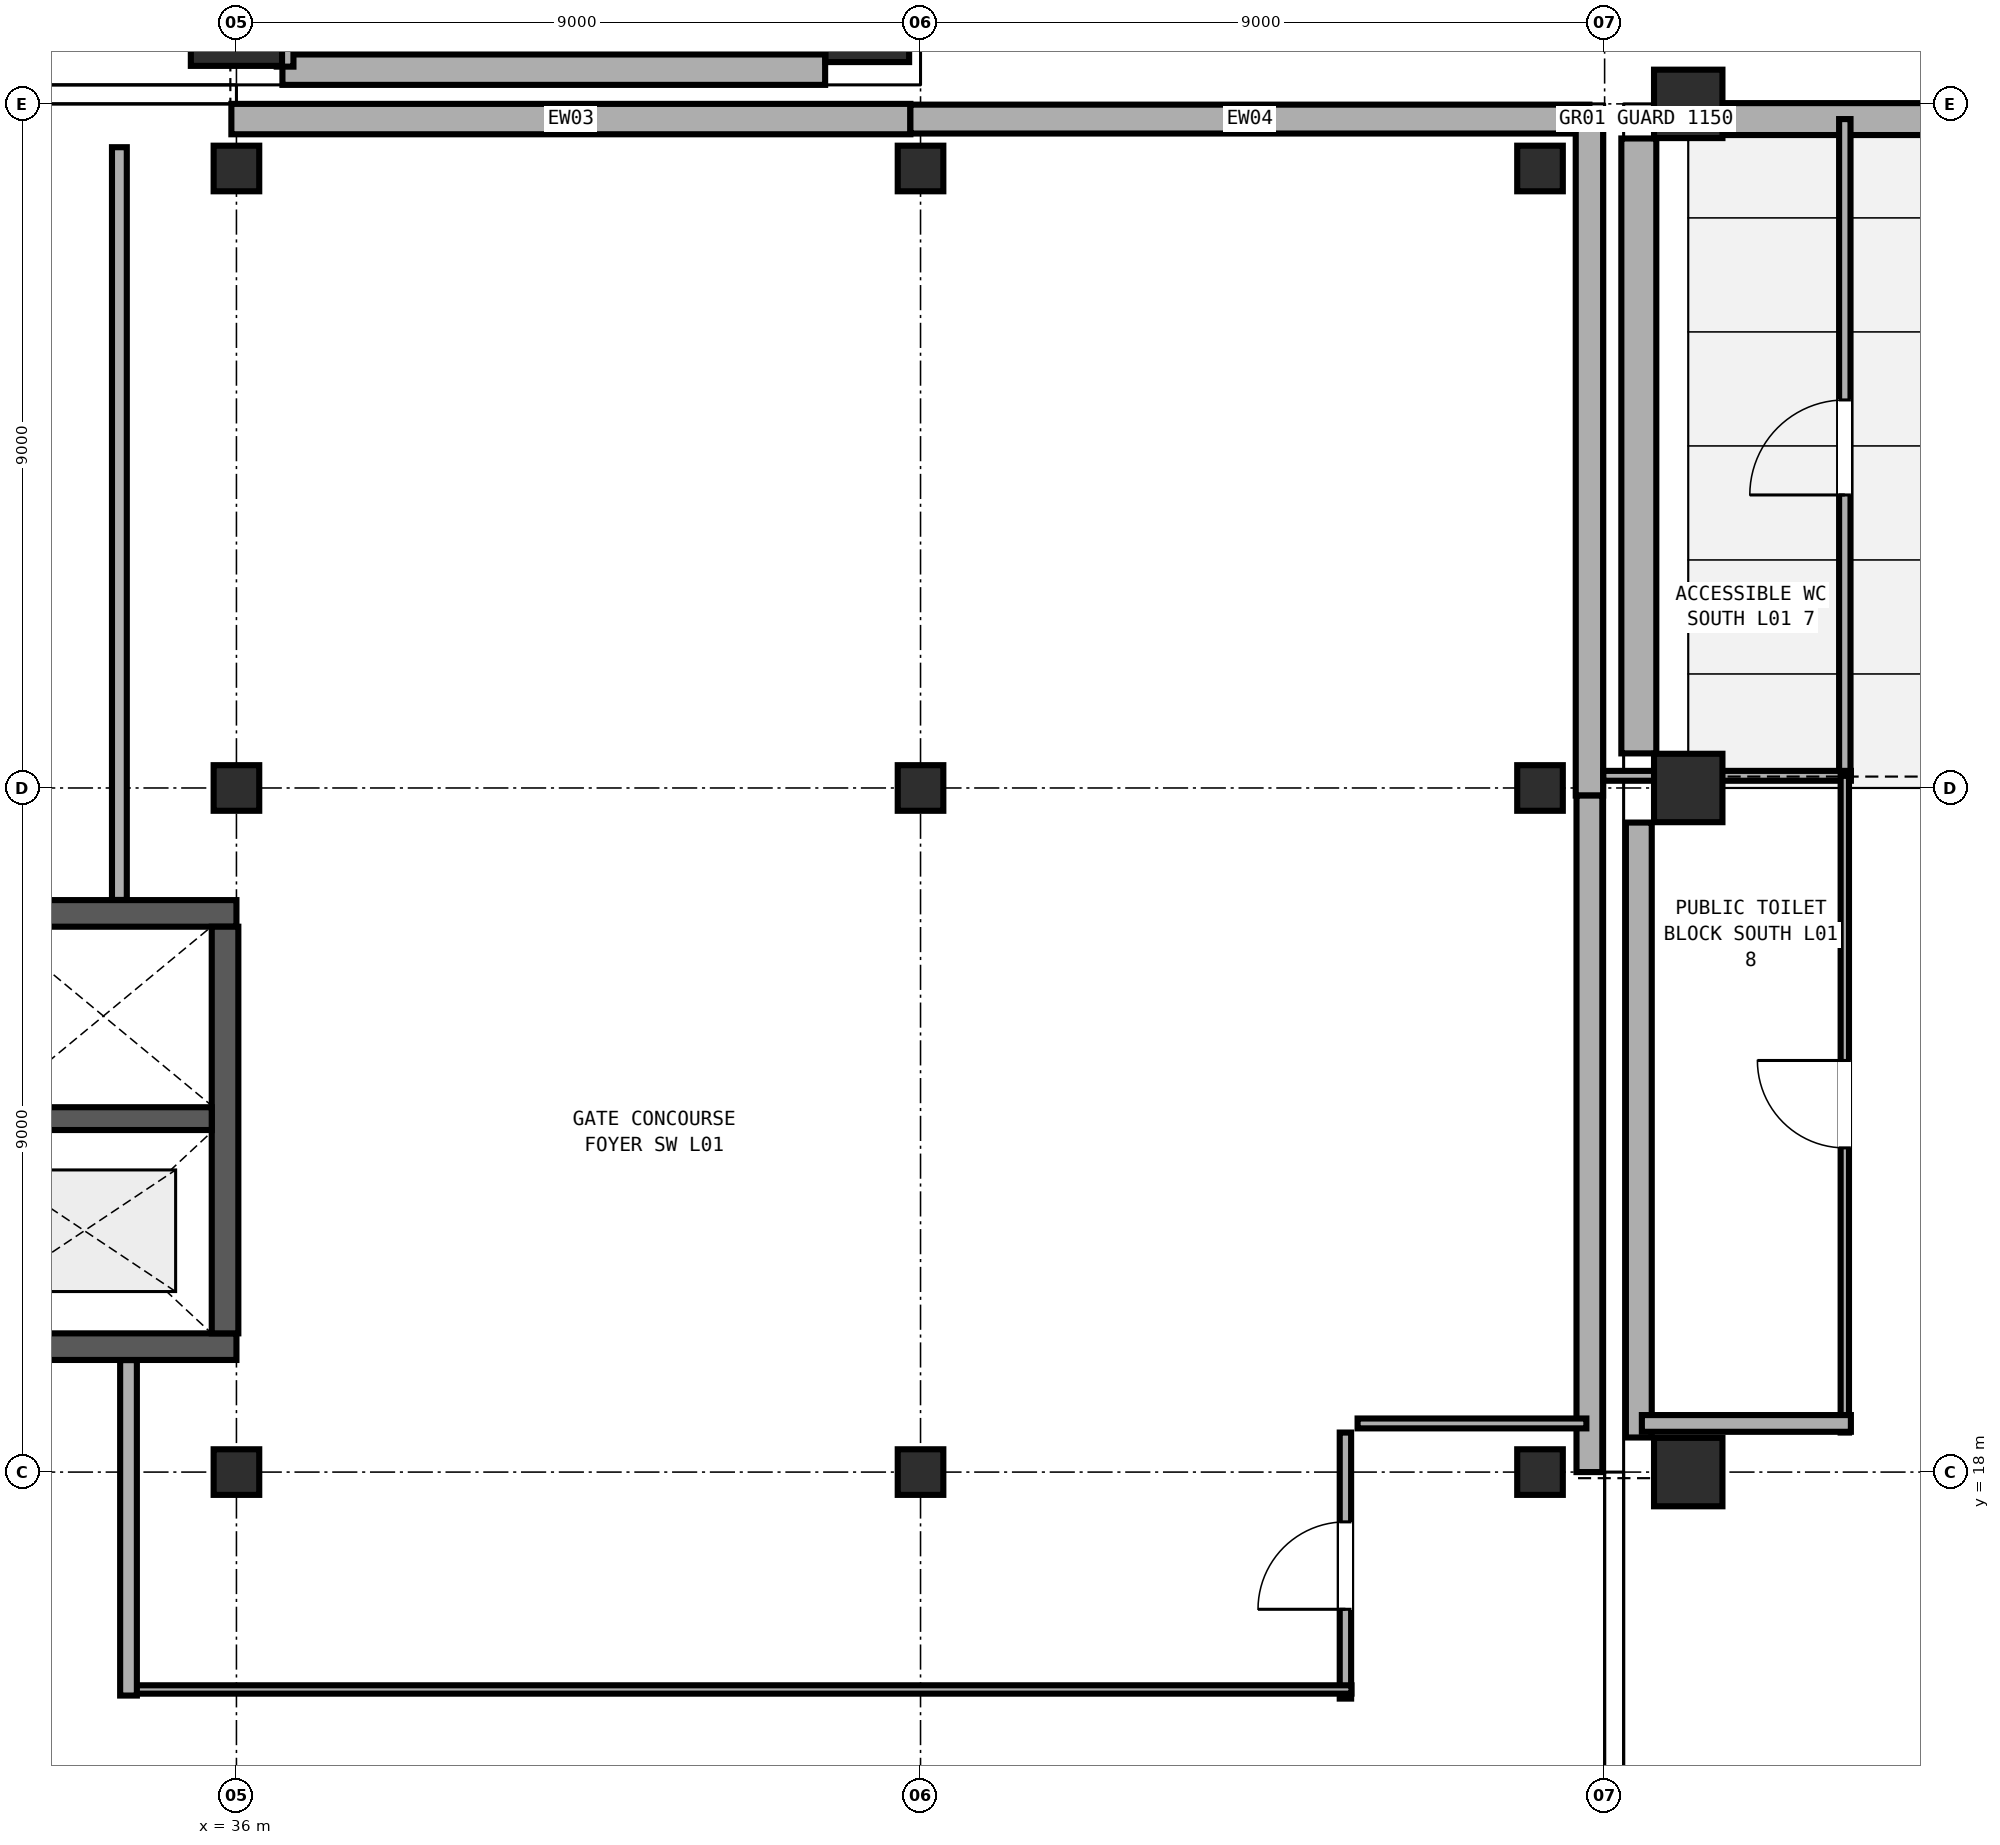
"""IFC4 building model, lengths in metres.
Left out: names, types, materials, properties, quantities, classifications, styles, units other than length and angle.
Written with IfcOpenShell. Run it as: python <this file> out.ifc"""

import sys

from ifc_helpers import new_model, si_unit, direction, frame, frame_2d, origin, origin_2d, place, context, subcontext, project, spatial, rectangle, extrude, element, fill, save


model = new_model("IFC4")
c1 = context("Model", 3, precision=1e-05, world=origin(), true_north=direction((0.0, 1.0)))
c2 = subcontext(c1, "Body", "Model", "MODEL_VIEW")
j1 = project(units=[si_unit("LENGTHUNIT", "METRE"), si_unit("PLANEANGLEUNIT", "RADIAN")], contexts=[c1])
p1 = place(None, origin())
s1 = spatial("IfcSite", under=j1, at=p1, CompositionType="ELEMENT")
p2 = place(p1, origin())
s2 = spatial("IfcBuilding", under=s1, at=p2, CompositionType="ELEMENT")
p3 = place(p2, frame((0.0, 0.0, 4.8)))
s3 = spatial("IfcBuildingStorey", under=s2, at=p3, CompositionType="ELEMENT", Elevation=4.8)
p4 = place(p3, frame((36.0, 37.1, 0.0), z_axis=(0.0, 0.0, 1.0), x_axis=(1.0, 0.0, 0.0)))
e1 = element("IfcColumn", 1, at=p4, inside=s3, PredefinedType="COLUMN", context=c2, shape_type="SweptSolid", body=[
    extrude(rectangle(XDim=1.2, YDim=1.2, at=origin_2d()), origin(), (0.0, 0.0, 1.0), 4.8),
])
p5 = place(p3, frame((44.3, 37.1, 0.0), z_axis=(0.0, 0.0, 1.0), x_axis=(1.0, 0.0, 0.0)))
e2 = element("IfcColumn", 2, at=p5, inside=s3, PredefinedType="COLUMN", context=c2, shape_type="SweptSolid", body=[
    extrude(rectangle(XDim=1.1, YDim=1.1, at=origin_2d()), origin(), (0.0, 0.0, 1.0), 4.8),
])
for number, where, z_axis, x_axis in (
    (3, (55.1, 18.0, 0.0), (0.0, 0.0, 1.0), (1.0, 0.0, 0.0)),
    (4, (55.1, 27.0, 0.0), (0.0, 0.0, 1.0), (1.0, 0.0, 0.0)),
    (5, (55.1, 36.0, 0.0), (0.0, 0.0, 1.0), (1.0, 0.0, 0.0)),
):
    element("IfcColumn", number, at=place(p3, frame(where, z_axis=z_axis, x_axis=x_axis)), inside=s3, PredefinedType="COLUMN", context=c2, shape_type="SweptSolid", body=[
        extrude(rectangle(XDim=0.9, YDim=0.9, at=origin_2d()), origin(), (0.0, 0.0, 1.0), 4.8),
    ])
for number, where, z_axis, x_axis in (
    (6, (36.0, 18.0, 0.0), (0.0, 0.0, 1.0), (1.0, 0.0, 0.0)),
    (7, (36.0, 27.0, 0.0), (0.0, 0.0, 1.0), (1.0, 0.0, 0.0)),
    (8, (36.0, 35.15, 0.0), (0.0, 0.0, 1.0), (1.0, 0.0, 0.0)),
    (9, (45.0, 18.0, 0.0), (0.0, 0.0, 1.0), (1.0, 0.0, 0.0)),
    (10, (45.0, 27.0, 0.0), (0.0, 0.0, 1.0), (1.0, 0.0, 0.0)),
    (11, (45.0, 35.15, 0.0), (0.0, 0.0, 1.0), (1.0, 0.0, 0.0)),
    (12, (53.15, 18.0, 0.0), (0.0, 0.0, 1.0), (1.0, 0.0, 0.0)),
    (13, (53.15, 27.0, 0.0), (0.0, 0.0, 1.0), (1.0, 0.0, 0.0)),
    (14, (53.15, 35.15, 0.0), (0.0, 0.0, 1.0), (1.0, 0.0, 0.0)),
):
    element("IfcColumn", number, at=place(p3, frame(where, z_axis=z_axis, x_axis=x_axis)), inside=s3, PredefinedType="COLUMN", context=c2, shape_type="SweptSolid", body=[
        extrude(rectangle(XDim=0.6, YDim=0.6, at=origin_2d()), origin(), (0.0, 0.0, 1.0), 4.8),
    ])
p6 = place(p3, frame((18.0, 19.65, 0.0), z_axis=(0.0, 0.0, 1.0), x_axis=(1.0, 0.0, 0.0)))
e15 = element("IfcWall", 15, at=p6, inside=s3, PredefinedType="SHEAR", context=c2, shape_type="SweptSolid", body=[
    extrude(rectangle(XDim=18.0, YDim=0.35, at=frame_2d((9.0, 0.0))), origin(), (0.0, 0.0, 1.0), 4.565),
])
p7 = place(p6, frame((11.4, 0.0, 0.0)))
e16 = element("IfcOpeningElement", 16, at=p7, cuts=e15, PredefinedType="OPENING", context=c2, shape_type="SweptSolid", body=[
    extrude(rectangle(XDim=1.9, YDim=2.25, at=frame_2d((0.95, 1.125))), frame((0.0, 0.185, 0.0), z_axis=(0.0, -1.0, 0.0), x_axis=(1.0, 0.0, 0.0)), (0.0, 0.0, 1.0), 0.37),
])
p8 = place(p3, frame((36.0, 25.35, 0.0), z_axis=(0.0, 0.0, 1.0), x_axis=(-1.0, 0.0, 0.0)))
e17 = element("IfcWall", 17, at=p8, inside=s3, PredefinedType="SHEAR", context=c2, shape_type="SweptSolid", body=[
    extrude(rectangle(XDim=18.0, YDim=0.35, at=frame_2d((9.0, 0.0))), origin(), (0.0, 0.0, 1.0), 4.565),
])
p9 = place(p3, frame((35.85, 19.825, 0.0), z_axis=(0.0, 0.0, 1.0), x_axis=(0.0, 1.0, 0.0)))
e18 = element("IfcWall", 18, at=p9, inside=s3, PredefinedType="SHEAR", context=c2, shape_type="SweptSolid", body=[
    extrude(rectangle(XDim=5.35, YDim=0.35, at=frame_2d((2.675, 0.0))), origin(), (0.0, 0.0, 1.0), 4.565),
])
p10 = place(p3, frame((32.8, 22.65, 0.0), z_axis=(0.0, 0.0, 1.0), x_axis=(1.0, 0.0, 0.0)))
e19 = element("IfcWall", 19, at=p10, inside=s3, PredefinedType="SHEAR", context=c2, shape_type="SweptSolid", body=[
    extrude(rectangle(XDim=2.875, YDim=0.3, at=frame_2d((1.438, 0.0))), origin(), (0.0, 0.0, 1.0), 4.565),
])
p11 = place(p3, frame((43.745, 36.45, 0.0), z_axis=(0.0, 0.0, 1.0), x_axis=(-1.0, 0.0, 0.0)))
e20 = element("IfcWall", 20, at=p11, inside=s3, PredefinedType="SOLIDWALL", context=c2, shape_type="SweptSolid", body=[
    extrude(rectangle(XDim=7.14, YDim=0.4, at=frame_2d((3.57, 0.0))), origin(), (0.0, 0.0, 1.0), 3.28),
])
p12 = place(p3, frame((54.45, 18.455, 0.0), z_axis=(0.0, 0.0, 1.0), x_axis=(0.0, 1.0, 0.0)))
e21 = element("IfcWall", 21, at=p12, inside=s3, PredefinedType="SOLIDWALL", context=c2, shape_type="SweptSolid", body=[
    extrude(rectangle(XDim=8.09, YDim=0.34, at=frame_2d((4.045, 0.0))), origin(), (0.0, 0.0, 1.0), 3.28),
])
p13 = place(p3, frame((54.45, 27.455, 0.0), z_axis=(0.0, 0.0, 1.0), x_axis=(0.0, 1.0, 0.0)))
e22 = element("IfcWall", 22, at=p13, inside=s3, PredefinedType="SOLIDWALL", context=c2, shape_type="SweptSolid", body=[
    extrude(rectangle(XDim=8.09, YDim=0.46, at=frame_2d((4.045, 0.0))), origin(), (0.0, 0.0, 1.0), 3.28),
])
p14 = place(p3, frame((55.555, 35.8, 0.0), z_axis=(0.0, 0.0, 1.0), x_axis=(1.0, 0.0, 0.0)))
e23 = element("IfcWall", 23, at=p14, inside=s3, PredefinedType="SOLIDWALL", context=c2, shape_type="SweptSolid", body=[
    extrude(rectangle(XDim=6.99, YDim=0.42, at=frame_2d((3.495, 0.0))), origin(), (0.0, 0.0, 1.0), 3.28),
])
p15 = place(p3, frame((35.933, 35.8, 0.0), z_axis=(0.0, 0.0, 1.0), x_axis=(1.0, 0.0, 0.0)))
e24 = element("IfcWall", 24, at=p15, inside=s3, PredefinedType="SOLIDWALL", context=c2, shape_type="SweptSolid", body=[
    extrude(rectangle(XDim=8.933, YDim=0.4, at=frame_2d((4.467, 0.0))), origin(), (0.0, 0.0, 1.0), 3.28),
])
p16 = place(p3, frame((44.867, 35.8, 0.0), z_axis=(0.0, 0.0, 1.0), x_axis=(1.0, 0.0, 0.0)))
e25 = element("IfcWall", 25, at=p16, inside=s3, PredefinedType="SOLIDWALL", context=c2, shape_type="SweptSolid", body=[
    extrude(rectangle(XDim=8.933, YDim=0.38, at=frame_2d((4.467, 0.0))), origin(), (0.0, 0.0, 1.0), 3.28),
])
p17 = place(p3, frame((53.8, 35.8, 0.0), z_axis=(0.0, 0.0, 1.0), x_axis=(0.0, -1.0, 0.0)))
e26 = element("IfcWall", 26, at=p17, inside=s3, PredefinedType="SOLIDWALL", context=c2, shape_type="SweptSolid", body=[
    extrude(rectangle(XDim=8.9, YDim=0.36, at=frame_2d((4.45, 0.0))), origin(), (0.0, 0.0, 1.0), 3.28),
])
p18 = place(p3, frame((53.8, 26.9, 0.0), z_axis=(0.0, 0.0, 1.0), x_axis=(0.0, -1.0, 0.0)))
e27 = element("IfcWall", 27, at=p18, inside=s3, PredefinedType="SOLIDWALL", context=c2, shape_type="SweptSolid", body=[
    extrude(rectangle(XDim=8.9, YDim=0.34, at=frame_2d((4.45, 0.0))), origin(), (0.0, 0.0, 1.0), 3.28),
])
p19 = place(p3, frame((36.64, 36.49, 0.0), z_axis=(0.0, 0.0, 1.0), x_axis=(0.0, 1.0, 0.0)))
e28 = element("IfcWall", 28, at=p19, inside=s3, PredefinedType="PARTITIONING", context=c2, shape_type="SweptSolid", body=[
    extrude(rectangle(XDim=3.01, YDim=0.22, at=frame_2d((1.505, 0.0))), origin(), (0.0, 0.0, 1.0), 3.28),
])
p20 = place(p3, frame((57.16, 27.16, 0.0), z_axis=(0.0, 0.0, 1.0), x_axis=(0.0, 1.0, 0.0)))
e29 = element("IfcWall", 29, at=p20, inside=s3, PredefinedType="PARTITIONING", context=c2, shape_type="SweptSolid", body=[
    extrude(rectangle(XDim=8.64, YDim=0.15, at=frame_2d((4.32, 0.0))), origin(), (0.0, 0.0, 1.0), 3.28),
])
p21 = place(p20, frame((3.695, 0.0, 0.0)))
e30 = element("IfcOpeningElement", 30, at=p21, cuts=e29, PredefinedType="OPENING", context=c2, shape_type="SweptSolid", body=[
    extrude(rectangle(XDim=1.25, YDim=2.15, at=frame_2d((0.625, 1.075))), frame((0.0, 0.085, 0.0), z_axis=(0.0, -1.0, 0.0), x_axis=(1.0, 0.0, 0.0)), (0.0, 0.0, 1.0), 0.17),
])
p22 = place(p3, frame((57.24, 27.16, 0.0), z_axis=(0.0, 0.0, 1.0), x_axis=(-1.0, 0.0, 0.0)))
e31 = element("IfcWall", 31, at=p22, inside=s3, PredefinedType="PARTITIONING", context=c2, shape_type="SweptSolid", body=[
    extrude(rectangle(XDim=3.257, YDim=0.13, at=frame_2d((1.628, 0.0))), origin(), (0.0, 0.0, 1.0), 3.28),
])
p23 = place(p3, frame((57.16, 18.52, 0.0), z_axis=(0.0, 0.0, 1.0), x_axis=(0.0, 1.0, 0.0)))
e32 = element("IfcWall", 32, at=p23, inside=s3, PredefinedType="PARTITIONING", context=c2, shape_type="SweptSolid", body=[
    extrude(rectangle(XDim=8.64, YDim=0.11, at=frame_2d((4.32, 0.0))), origin(), (0.0, 0.0, 1.0), 3.28),
])
p24 = place(p23, frame((3.745, 0.0, 0.0)))
e33 = element("IfcOpeningElement", 33, at=p24, cuts=e32, PredefinedType="OPENING", context=c2, shape_type="SweptSolid", body=[
    extrude(rectangle(XDim=1.15, YDim=2.15, at=frame_2d((0.575, 1.075))), frame((0.0, 0.065, 0.0), z_axis=(0.0, -1.0, 0.0), x_axis=(1.0, 0.0, 0.0)), (0.0, 0.0, 1.0), 0.13),
])
p25 = place(p3, frame((57.24, 18.64, 0.0), z_axis=(0.0, 0.0, 1.0), x_axis=(-1.0, 0.0, 0.0)))
e34 = element("IfcWall", 34, at=p25, inside=s3, PredefinedType="PARTITIONING", context=c2, shape_type="SweptSolid", body=[
    extrude(rectangle(XDim=2.75, YDim=0.22, at=frame_2d((1.375, 0.0))), origin(), (0.0, 0.0, 1.0), 3.28),
])
p26 = place(p3, frame((50.59, 15.02, 0.0), z_axis=(0.0, 0.0, 1.0), x_axis=(0.0, 1.0, 0.0)))
e35 = element("IfcWall", 35, at=p26, inside=s3, PredefinedType="PARTITIONING", context=c2, shape_type="SweptSolid", body=[
    extrude(rectangle(XDim=3.5, YDim=0.15, at=frame_2d((1.75, 0.0))), origin(), (0.0, 0.0, 1.0), 3.28),
])
p27 = place(p26, frame((1.175, 0.0, 0.0)))
e36 = element("IfcOpeningElement", 36, at=p27, cuts=e35, PredefinedType="OPENING", context=c2, shape_type="SweptSolid", body=[
    extrude(rectangle(XDim=1.15, YDim=2.15, at=frame_2d((0.575, 1.075))), frame((0.0, 0.085, 0.0), z_axis=(0.0, -1.0, 0.0), x_axis=(1.0, 0.0, 0.0)), (0.0, 0.0, 1.0), 0.17),
])
p28 = place(p3, frame((53.76, 18.64, 0.0), z_axis=(0.0, 0.0, 1.0), x_axis=(-1.0, 0.0, 0.0)))
e37 = element("IfcWall", 37, at=p28, inside=s3, PredefinedType="PARTITIONING", context=c2, shape_type="SweptSolid", body=[
    extrude(rectangle(XDim=3.01, YDim=0.13, at=frame_2d((1.505, 0.0))), origin(), (0.0, 0.0, 1.0), 3.28),
])
p29 = place(p3, frame((50.67, 15.14, 0.0), z_axis=(0.0, 0.0, 1.0), x_axis=(-1.0, 0.0, 0.0)))
e38 = element("IfcWall", 38, at=p29, inside=s3, PredefinedType="PARTITIONING", context=c2, shape_type="SweptSolid", body=[
    extrude(rectangle(XDim=16.17, YDim=0.11, at=frame_2d((8.085, 0.0))), origin(), (0.0, 0.0, 1.0), 3.28),
])
p30 = place(p3, frame((34.58, 15.06, 0.0), z_axis=(0.0, 0.0, 1.0), x_axis=(0.0, 1.0, 0.0)))
e39 = element("IfcWall", 39, at=p30, inside=s3, PredefinedType="PARTITIONING", context=c2, shape_type="SweptSolid", body=[
    extrude(rectangle(XDim=4.413, YDim=0.22, at=frame_2d((2.207, 0.0))), origin(), (0.0, 0.0, 1.0), 3.28),
])
p31 = place(p3, frame((34.46, 25.527, 0.0), z_axis=(0.0, 0.0, 1.0), x_axis=(0.0, 1.0, 0.0)))
e40 = element("IfcWall", 40, at=p31, inside=s3, PredefinedType="PARTITIONING", context=c2, shape_type="SweptSolid", body=[
    extrude(rectangle(XDim=9.903, YDim=0.195, at=frame_2d((4.951, 0.0))), origin(), (0.0, 0.0, 1.0), 3.28),
])
p32 = place(p21, origin())
e41 = element("IfcDoor", 41, at=p32, inside=s3, OperationType="SINGLE_SWING_LEFT", PredefinedType="DOOR", context=c2, shape_type="SweptSolid", body=[
    extrude(rectangle(XDim=1.25, YDim=2.15, at=frame_2d((0.625, 1.075))), frame((0.0, 0.025, 0.0), z_axis=(0.0, -1.0, 0.0), x_axis=(1.0, 0.0, 0.0)), (0.0, 0.0, 1.0), 0.05),
])
fill(e30, e41)
p33 = place(p24, origin())
e42 = element("IfcDoor", 42, at=p33, inside=s3, OperationType="SINGLE_SWING_RIGHT", PredefinedType="DOOR", context=c2, shape_type="SweptSolid", body=[
    extrude(rectangle(XDim=1.15, YDim=2.15, at=frame_2d((0.575, 1.075))), frame((0.0, 0.025, 0.0), z_axis=(0.0, -1.0, 0.0), x_axis=(1.0, 0.0, 0.0)), (0.0, 0.0, 1.0), 0.05),
])
fill(e33, e42)
p34 = place(p27, origin())
e43 = element("IfcDoor", 43, at=p34, inside=s3, OperationType="SINGLE_SWING_LEFT", PredefinedType="DOOR", context=c2, shape_type="SweptSolid", body=[
    extrude(rectangle(XDim=1.15, YDim=2.15, at=frame_2d((0.575, 1.075))), frame((0.0, 0.025, 0.0), z_axis=(0.0, -1.0, 0.0), x_axis=(1.0, 0.0, 0.0)), (0.0, 0.0, 1.0), 0.05),
])
fill(e36, e43)
save(model, sys.argv[1])
